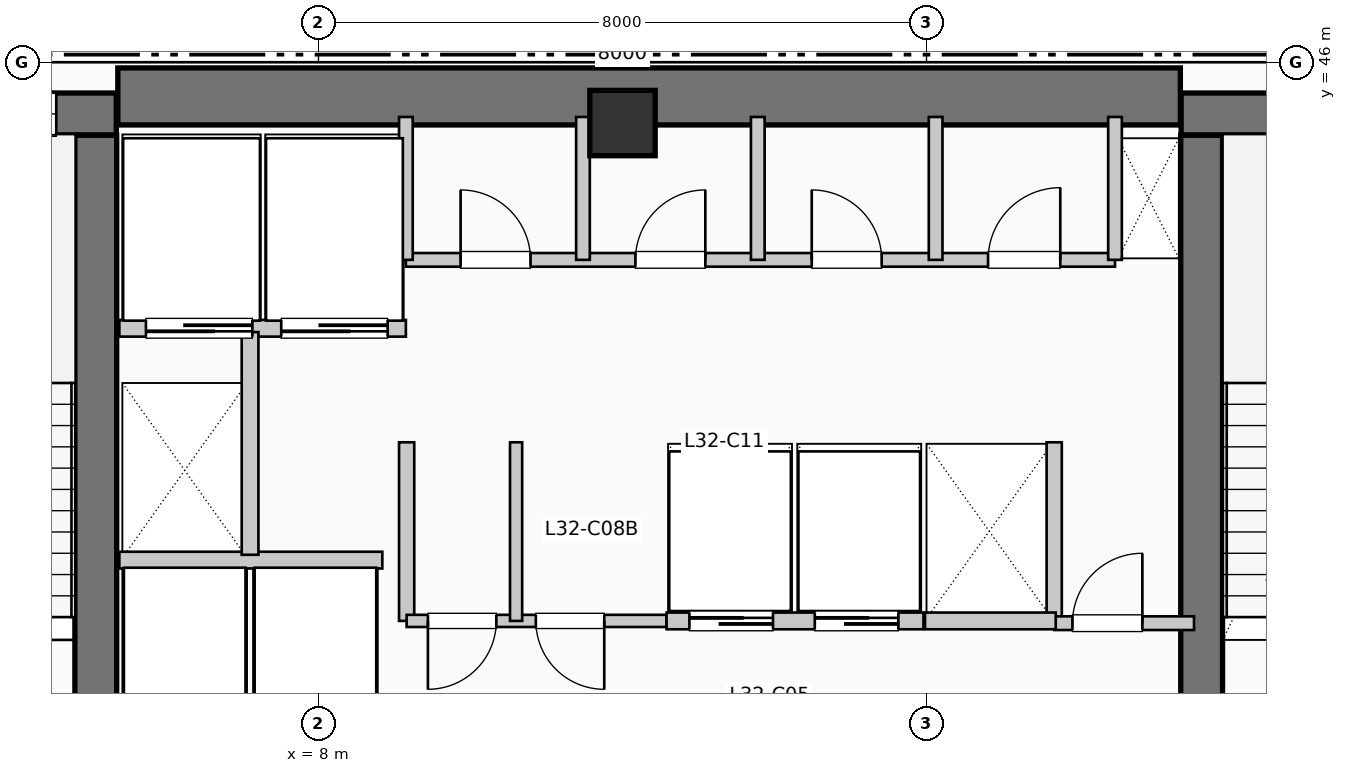
"""IFC4 building model, lengths in metres.
Left out: names, types, materials, properties, quantities, classifications, styles, units other than length and angle.
Written with IfcOpenShell. Run it as: python <this file> out.ifc"""

import sys

from ifc_helpers import new_model, si_unit, direction, frame, frame_2d, origin, origin_2d, place, context, subcontext, project, spatial, rectangle, extrude, element, fill, save


model = new_model("IFC4")
c1 = context("Model", 3, precision=1e-05, world=origin(), true_north=direction((0.0, 1.0)))
c2 = subcontext(c1, "Body", "Model", "MODEL_VIEW")
j1 = project(units=[si_unit("LENGTHUNIT", "METRE"), si_unit("PLANEANGLEUNIT", "RADIAN")], contexts=[c1])
p1 = place(None, origin())
s1 = spatial("IfcSite", under=j1, at=p1, CompositionType="ELEMENT")
p2 = place(p1, origin())
s2 = spatial("IfcBuilding", under=s1, at=p2, CompositionType="ELEMENT")
p3 = place(p2, frame((0.0, 0.0, 134.97)))
s3 = spatial("IfcBuildingStorey", under=s2, at=p3, CompositionType="ELEMENT", Elevation=134.97)
p4 = place(p3, frame((5.36, 45.55, 0.0), z_axis=(0.0, 0.0, 1.0), x_axis=(1.0, 0.0, 0.0)))
e1 = element("IfcWall", 1, at=p4, inside=s3, PredefinedType="SHEAR", context=c2, shape_type="SweptSolid", body=[
    extrude(rectangle(XDim=13.98, YDim=0.75, at=frame_2d((6.99, 0.0))), origin(), (0.0, 0.0, 1.0), 3.96),
])
p5 = place(p3, frame((5.07, 37.15, 0.0), z_axis=(0.0, 0.0, 1.0), x_axis=(0.0, 1.0, 0.0)))
e2 = element("IfcWall", 2, at=p5, inside=s3, PredefinedType="SHEAR", context=c2, shape_type="SweptSolid", body=[
    extrude(rectangle(XDim=7.89, YDim=0.55, at=frame_2d((3.945, 0.0))), origin(), (0.0, 0.0, 1.0), 3.96),
])
p6 = place(p3, frame((1.1, 45.32, 0.0), z_axis=(0.0, 0.0, 1.0), x_axis=(1.0, 0.0, 0.0)))
e3 = element("IfcWall", 3, at=p6, inside=s3, PredefinedType="SHEAR", context=c2, shape_type="SweptSolid", body=[
    extrude(rectangle(XDim=4.24, YDim=0.55, at=frame_2d((2.12, 0.0))), origin(), (0.0, 0.0, 1.0), 3.96),
])
p7 = place(p6, frame((2.05, 0.0, 1.05)))
e4 = element("IfcOpeningElement", 4, at=p7, cuts=e3, PredefinedType="OPENING", context=c2, shape_type="SweptSolid", body=[
    extrude(rectangle(XDim=1.4, YDim=1.8, at=frame_2d((0.7, 0.9))), frame((0.0, 0.285, 0.0), z_axis=(0.0, -1.0, 0.0), x_axis=(1.0, 0.0, 0.0)), (0.0, 0.0, 1.0), 0.57),
])
p8 = place(p3, frame((19.62, 37.15, 0.0), z_axis=(0.0, 0.0, 1.0), x_axis=(0.0, 1.0, 0.0)))
e5 = element("IfcWall", 5, at=p8, inside=s3, PredefinedType="SHEAR", context=c2, shape_type="SweptSolid", body=[
    extrude(rectangle(XDim=7.89, YDim=0.55, at=frame_2d((3.945, 0.0))), origin(), (0.0, 0.0, 1.0), 3.96),
])
p9 = place(p3, frame((19.35, 45.32, 0.0), z_axis=(0.0, 0.0, 1.0), x_axis=(1.0, 0.0, 0.0)))
e6 = element("IfcWall", 6, at=p9, inside=s3, PredefinedType="SHEAR", context=c2, shape_type="SweptSolid", body=[
    extrude(rectangle(XDim=3.69, YDim=0.55, at=frame_2d((1.845, 0.0))), origin(), (0.0, 0.0, 1.0), 3.96),
])
p10 = place(p9, frame((1.15, 0.0, 1.05)))
e7 = element("IfcOpeningElement", 7, at=p10, cuts=e6, PredefinedType="OPENING", context=c2, shape_type="SweptSolid", body=[
    extrude(rectangle(XDim=1.4, YDim=1.8, at=frame_2d((0.7, 0.9))), frame((0.0, 0.285, 0.0), z_axis=(0.0, -1.0, 0.0), x_axis=(1.0, 0.0, 0.0)), (0.0, 0.0, 1.0), 0.57),
])
p11 = place(p3, frame((12.0, 45.2, 0.0), z_axis=(0.0, 0.0, 1.0), x_axis=(1.0, 0.0, 0.0)))
e8 = element("IfcColumn", 8, at=p11, inside=s3, PredefinedType="COLUMN", context=c2, shape_type="SweptSolid", body=[
    extrude(rectangle(XDim=0.86, YDim=0.86, at=origin_2d()), origin(), (0.0, 0.0, 1.0), 3.96),
])
p12 = place(p3, frame((5.38, 39.45, 0.0), z_axis=(0.0, 0.0, 1.0), x_axis=(1.0, 0.0, 0.0)))
e9 = element("IfcWall", 9, at=p12, inside=s3, PredefinedType="PARTITIONING", context=c2, shape_type="SweptSolid", body=[
    extrude(rectangle(XDim=3.46, YDim=0.22, at=frame_2d((1.73, 0.0))), origin(), (0.0, 0.0, 1.0), 3.71),
])
p13 = place(p3, frame((5.38, 42.5, 0.0), z_axis=(0.0, 0.0, 1.0), x_axis=(1.0, 0.0, 0.0)))
e10 = element("IfcWall", 10, at=p13, inside=s3, PredefinedType="PARTITIONING", context=c2, shape_type="SweptSolid", body=[
    extrude(rectangle(XDim=3.77, YDim=0.22, at=frame_2d((1.885, 0.0))), origin(), (0.0, 0.0, 1.0), 3.71),
])
p14 = place(p13, frame((1.75, 0.0, 0.0), z_axis=(0.0, 0.0, 1.0), x_axis=(-1.0, 0.0, 0.0)))
e11 = element("IfcOpeningElement", 11, at=p14, cuts=e10, PredefinedType="OPENING", context=c2, shape_type="SweptSolid", body=[
    extrude(rectangle(XDim=1.4, YDim=2.2, at=frame_2d((0.7, 1.1))), frame((0.0, 0.12, 0.0), z_axis=(0.0, -1.0, 0.0), x_axis=(1.0, 0.0, 0.0)), (0.0, 0.0, 1.0), 0.24),
])
p15 = place(p13, frame((3.53, 0.0, 0.0), z_axis=(0.0, 0.0, 1.0), x_axis=(-1.0, 0.0, 0.0)))
e12 = element("IfcOpeningElement", 12, at=p15, cuts=e10, PredefinedType="OPENING", context=c2, shape_type="SweptSolid", body=[
    extrude(rectangle(XDim=1.4, YDim=2.2, at=frame_2d((0.7, 1.1))), frame((0.0, 0.12, 0.0), z_axis=(0.0, -1.0, 0.0), x_axis=(1.0, 0.0, 0.0)), (0.0, 0.0, 1.0), 0.24),
])
p16 = place(p3, frame((7.1, 39.52, 0.0), z_axis=(0.0, 0.0, 1.0), x_axis=(0.0, 1.0, 0.0)))
e13 = element("IfcWall", 13, at=p16, inside=s3, PredefinedType="PARTITIONING", context=c2, shape_type="SweptSolid", body=[
    extrude(rectangle(XDim=2.93, YDim=0.22, at=frame_2d((1.465, 0.0))), origin(), (0.0, 0.0, 1.0), 3.71),
])
for number, where, z_axis, x_axis in (
    (14, (9.16, 38.65, 0.0), (0.0, 0.0, 1.0), (0.0, 1.0, 0.0)),
    (15, (17.68, 38.65, 0.0), (0.0, 0.0, 1.0), (0.0, 1.0, 0.0)),
):
    element("IfcWall", number, at=place(p3, frame(where, z_axis=z_axis, x_axis=x_axis)), inside=s3, PredefinedType="PARTITIONING", context=c2, shape_type="SweptSolid", body=[
        extrude(rectangle(XDim=2.35, YDim=0.2, at=frame_2d((1.175, 0.0))), origin(), (0.0, 0.0, 1.0), 3.71),
    ])
p17 = place(p3, frame((17.68, 38.62, 0.0), z_axis=(0.0, 0.0, 1.0), x_axis=(1.0, 0.0, 0.0)))
e16 = element("IfcWall", 16, at=p17, inside=s3, PredefinedType="PARTITIONING", context=c2, shape_type="SweptSolid", body=[
    extrude(rectangle(XDim=1.84, YDim=0.18, at=frame_2d((0.92, 0.0))), origin(), (0.0, 0.0, 1.0), 3.71),
])
p18 = place(p17, frame((0.24, 0.0, 0.0)))
e17 = element("IfcOpeningElement", 17, at=p18, cuts=e16, PredefinedType="OPENING", context=c2, shape_type="SweptSolid", body=[
    extrude(rectangle(XDim=0.92, YDim=2.1, at=frame_2d((0.46, 1.05))), frame((0.0, 0.1, 0.0), z_axis=(0.0, -1.0, 0.0), x_axis=(1.0, 0.0, 0.0)), (0.0, 0.0, 1.0), 0.2),
])
p19 = place(p3, frame((9.16, 38.65, 0.0), z_axis=(0.0, 0.0, 1.0), x_axis=(1.0, 0.0, 0.0)))
e18 = element("IfcWall", 18, at=p19, inside=s3, PredefinedType="PARTITIONING", context=c2, shape_type="SweptSolid", body=[
    extrude(rectangle(XDim=3.42, YDim=0.16, at=frame_2d((1.71, 0.0))), origin(), (0.0, 0.0, 1.0), 3.71),
])
p20 = place(p19, frame((1.18, 0.0, 0.0), z_axis=(0.0, 0.0, 1.0), x_axis=(-1.0, 0.0, 0.0)))
e19 = element("IfcOpeningElement", 19, at=p20, cuts=e18, PredefinedType="OPENING", context=c2, shape_type="SweptSolid", body=[
    extrude(rectangle(XDim=0.9, YDim=2.15, at=frame_2d((0.45, 1.075))), frame((0.0, 0.09, 0.0), z_axis=(0.0, -1.0, 0.0), x_axis=(1.0, 0.0, 0.0)), (0.0, 0.0, 1.0), 0.18),
])
p21 = place(p19, frame((2.6, 0.0, 0.0), z_axis=(0.0, 0.0, 1.0), x_axis=(-1.0, 0.0, 0.0)))
e20 = element("IfcOpeningElement", 20, at=p21, cuts=e18, PredefinedType="OPENING", context=c2, shape_type="SweptSolid", body=[
    extrude(rectangle(XDim=0.9, YDim=2.15, at=frame_2d((0.45, 1.075))), frame((0.0, 0.09, 0.0), z_axis=(0.0, -1.0, 0.0), x_axis=(1.0, 0.0, 0.0)), (0.0, 0.0, 1.0), 0.18),
])
p22 = place(p3, frame((10.6, 38.65, 0.0), z_axis=(0.0, 0.0, 1.0), x_axis=(0.0, 1.0, 0.0)))
e21 = element("IfcWall", 21, at=p22, inside=s3, PredefinedType="PARTITIONING", context=c2, shape_type="SweptSolid", body=[
    extrude(rectangle(XDim=2.35, YDim=0.16, at=frame_2d((1.175, 0.0))), origin(), (0.0, 0.0, 1.0), 3.71),
])
p23 = place(p3, frame((12.58, 38.65, 0.0), z_axis=(0.0, 0.0, 1.0), x_axis=(1.0, 0.0, 0.0)))
e22 = element("IfcWall", 22, at=p23, inside=s3, PredefinedType="PARTITIONING", context=c2, shape_type="SweptSolid", body=[
    extrude(rectangle(XDim=3.38, YDim=0.22, at=frame_2d((1.69, 0.0))), origin(), (0.0, 0.0, 1.0), 3.71),
])
p24 = place(p23, frame((0.3, 0.0, 0.0)))
e23 = element("IfcOpeningElement", 23, at=p24, cuts=e22, PredefinedType="OPENING", context=c2, shape_type="SweptSolid", body=[
    extrude(rectangle(XDim=1.1, YDim=2.2, at=frame_2d((0.55, 1.1))), frame((0.0, 0.12, 0.0), z_axis=(0.0, -1.0, 0.0), x_axis=(1.0, 0.0, 0.0)), (0.0, 0.0, 1.0), 0.24),
])
p25 = place(p23, frame((1.95, 0.0, 0.0)))
e24 = element("IfcOpeningElement", 24, at=p25, cuts=e22, PredefinedType="OPENING", context=c2, shape_type="SweptSolid", body=[
    extrude(rectangle(XDim=1.1, YDim=2.2, at=frame_2d((0.55, 1.1))), frame((0.0, 0.12, 0.0), z_axis=(0.0, -1.0, 0.0), x_axis=(1.0, 0.0, 0.0)), (0.0, 0.0, 1.0), 0.24),
])
p26 = place(p3, frame((15.98, 38.65, 0.0), z_axis=(0.0, 0.0, 1.0), x_axis=(1.0, 0.0, 0.0)))
e25 = element("IfcWall", 25, at=p26, inside=s3, PredefinedType="PARTITIONING", context=c2, shape_type="SweptSolid", body=[
    extrude(rectangle(XDim=1.72, YDim=0.22, at=frame_2d((0.86, 0.0))), origin(), (0.0, 0.0, 1.0), 3.71),
])
p27 = place(p3, frame((9.15, 43.4, 0.0), z_axis=(0.0, 0.0, 1.0), x_axis=(1.0, 0.0, 0.0)))
e26 = element("IfcWall", 26, at=p27, inside=s3, PredefinedType="PLUMBINGWALL", context=c2, shape_type="SweptSolid", body=[
    extrude(rectangle(XDim=9.33, YDim=0.18, at=frame_2d((4.665, 0.0))), origin(), (0.0, 0.0, 1.0), 3.71),
])
p28 = place(p27, frame((0.72, 0.0, 0.0)))
e27 = element("IfcOpeningElement", 27, at=p28, cuts=e26, PredefinedType="OPENING", context=c2, shape_type="SweptSolid", body=[
    extrude(rectangle(XDim=0.92, YDim=2.1, at=frame_2d((0.46, 1.05))), frame((0.0, 0.1, 0.0), z_axis=(0.0, -1.0, 0.0), x_axis=(1.0, 0.0, 0.0)), (0.0, 0.0, 1.0), 0.2),
])
p29 = place(p27, frame((3.02, 0.0, 0.0)))
e28 = element("IfcOpeningElement", 28, at=p29, cuts=e26, PredefinedType="OPENING", context=c2, shape_type="SweptSolid", body=[
    extrude(rectangle(XDim=0.92, YDim=2.1, at=frame_2d((0.46, 1.05))), frame((0.0, 0.1, 0.0), z_axis=(0.0, -1.0, 0.0), x_axis=(1.0, 0.0, 0.0)), (0.0, 0.0, 1.0), 0.2),
])
p30 = place(p27, frame((5.34, 0.0, 0.0)))
e29 = element("IfcOpeningElement", 29, at=p30, cuts=e26, PredefinedType="OPENING", context=c2, shape_type="SweptSolid", body=[
    extrude(rectangle(XDim=0.92, YDim=2.1, at=frame_2d((0.46, 1.05))), frame((0.0, 0.1, 0.0), z_axis=(0.0, -1.0, 0.0), x_axis=(1.0, 0.0, 0.0)), (0.0, 0.0, 1.0), 0.2),
])
p31 = place(p27, frame((7.66, 0.0, 0.0)))
e30 = element("IfcOpeningElement", 30, at=p31, cuts=e26, PredefinedType="OPENING", context=c2, shape_type="SweptSolid", body=[
    extrude(rectangle(XDim=0.95, YDim=2.1, at=frame_2d((0.475, 1.05))), frame((0.0, 0.1, 0.0), z_axis=(0.0, -1.0, 0.0), x_axis=(1.0, 0.0, 0.0)), (0.0, 0.0, 1.0), 0.2),
])
for number, where, z_axis, x_axis in (
    (31, (9.15, 43.4, 0.0), (0.0, 0.0, 1.0), (0.0, 1.0, 0.0)),
    (32, (18.48, 43.4, 0.0), (0.0, 0.0, 1.0), (0.0, 1.0, 0.0)),
    (33, (11.48, 43.4, 0.0), (0.0, 0.0, 1.0), (0.0, 1.0, 0.0)),
    (34, (13.78, 43.4, 0.0), (0.0, 0.0, 1.0), (0.0, 1.0, 0.0)),
    (35, (16.12, 43.4, 0.0), (0.0, 0.0, 1.0), (0.0, 1.0, 0.0)),
):
    element("IfcWall", number, at=place(p3, frame(where, z_axis=z_axis, x_axis=x_axis)), inside=s3, PredefinedType="PLUMBINGWALL", context=c2, shape_type="SweptSolid", body=[
        extrude(rectangle(XDim=1.88, YDim=0.18, at=frame_2d((0.94, 0.0))), origin(), (0.0, 0.0, 1.0), 3.71),
    ])
p32 = place(p7, origin())
e36 = element("IfcWindow", 36, at=p32, inside=s3, PartitioningType="SINGLE_PANEL", PredefinedType="WINDOW", context=c2, shape_type="SweptSolid", body=[
    extrude(rectangle(XDim=1.4, YDim=1.8, at=frame_2d((0.7, 0.9))), frame((0.0, 0.03, 0.0), z_axis=(0.0, -1.0, 0.0), x_axis=(1.0, 0.0, 0.0)), (0.0, 0.0, 1.0), 0.06),
])
fill(e4, e36)
p33 = place(p14, origin())
e37 = element("IfcDoor", 37, at=p33, inside=s3, OperationType="SLIDING_TO_LEFT", PredefinedType="DOOR", context=c2, shape_type="SweptSolid", body=[
    extrude(rectangle(XDim=1.4, YDim=2.2, at=frame_2d((0.7, 1.1))), frame((0.0, 0.025, 0.0), z_axis=(0.0, -1.0, 0.0), x_axis=(1.0, 0.0, 0.0)), (0.0, 0.0, 1.0), 0.05),
])
fill(e11, e37)
p34 = place(p15, origin())
e38 = element("IfcDoor", 38, at=p34, inside=s3, OperationType="SLIDING_TO_LEFT", PredefinedType="DOOR", context=c2, shape_type="SweptSolid", body=[
    extrude(rectangle(XDim=1.4, YDim=2.2, at=frame_2d((0.7, 1.1))), frame((0.0, 0.025, 0.0), z_axis=(0.0, -1.0, 0.0), x_axis=(1.0, 0.0, 0.0)), (0.0, 0.0, 1.0), 0.05),
])
fill(e12, e38)
p35 = place(p18, origin())
e39 = element("IfcDoor", 39, at=p35, inside=s3, OperationType="SINGLE_SWING_RIGHT", PredefinedType="DOOR", context=c2, shape_type="SweptSolid", body=[
    extrude(rectangle(XDim=0.92, YDim=2.1, at=frame_2d((0.46, 1.05))), frame((0.0, 0.025, 0.0), z_axis=(0.0, -1.0, 0.0), x_axis=(1.0, 0.0, 0.0)), (0.0, 0.0, 1.0), 0.05),
])
fill(e17, e39)
p36 = place(p20, origin())
e40 = element("IfcDoor", 40, at=p36, inside=s3, OperationType="SINGLE_SWING_LEFT", PredefinedType="DOOR", context=c2, shape_type="SweptSolid", body=[
    extrude(rectangle(XDim=0.9, YDim=2.15, at=frame_2d((0.45, 1.075))), frame((0.0, 0.025, 0.0), z_axis=(0.0, -1.0, 0.0), x_axis=(1.0, 0.0, 0.0)), (0.0, 0.0, 1.0), 0.05),
])
fill(e19, e40)
p37 = place(p21, origin())
e41 = element("IfcDoor", 41, at=p37, inside=s3, OperationType="SINGLE_SWING_RIGHT", PredefinedType="DOOR", context=c2, shape_type="SweptSolid", body=[
    extrude(rectangle(XDim=0.9, YDim=2.15, at=frame_2d((0.45, 1.075))), frame((0.0, 0.025, 0.0), z_axis=(0.0, -1.0, 0.0), x_axis=(1.0, 0.0, 0.0)), (0.0, 0.0, 1.0), 0.05),
])
fill(e20, e41)
p38 = place(p24, origin())
e42 = element("IfcDoor", 42, at=p38, inside=s3, OperationType="SLIDING_TO_RIGHT", PredefinedType="DOOR", context=c2, shape_type="SweptSolid", body=[
    extrude(rectangle(XDim=1.1, YDim=2.2, at=frame_2d((0.55, 1.1))), frame((0.0, 0.025, 0.0), z_axis=(0.0, -1.0, 0.0), x_axis=(1.0, 0.0, 0.0)), (0.0, 0.0, 1.0), 0.05),
])
fill(e23, e42)
p39 = place(p25, origin())
e43 = element("IfcDoor", 43, at=p39, inside=s3, OperationType="SLIDING_TO_RIGHT", PredefinedType="DOOR", context=c2, shape_type="SweptSolid", body=[
    extrude(rectangle(XDim=1.1, YDim=2.2, at=frame_2d((0.55, 1.1))), frame((0.0, 0.025, 0.0), z_axis=(0.0, -1.0, 0.0), x_axis=(1.0, 0.0, 0.0)), (0.0, 0.0, 1.0), 0.05),
])
fill(e24, e43)
p40 = place(p28, origin())
e44 = element("IfcDoor", 44, at=p40, inside=s3, OperationType="SINGLE_SWING_LEFT", PredefinedType="DOOR", context=c2, shape_type="SweptSolid", body=[
    extrude(rectangle(XDim=0.92, YDim=2.1, at=frame_2d((0.46, 1.05))), frame((0.0, 0.025, 0.0), z_axis=(0.0, -1.0, 0.0), x_axis=(1.0, 0.0, 0.0)), (0.0, 0.0, 1.0), 0.05),
])
fill(e27, e44)
p41 = place(p29, origin())
e45 = element("IfcDoor", 45, at=p41, inside=s3, OperationType="SINGLE_SWING_RIGHT", PredefinedType="DOOR", context=c2, shape_type="SweptSolid", body=[
    extrude(rectangle(XDim=0.92, YDim=2.1, at=frame_2d((0.46, 1.05))), frame((0.0, 0.025, 0.0), z_axis=(0.0, -1.0, 0.0), x_axis=(1.0, 0.0, 0.0)), (0.0, 0.0, 1.0), 0.05),
])
fill(e28, e45)
p42 = place(p30, origin())
e46 = element("IfcDoor", 46, at=p42, inside=s3, OperationType="SINGLE_SWING_LEFT", PredefinedType="DOOR", context=c2, shape_type="SweptSolid", body=[
    extrude(rectangle(XDim=0.92, YDim=2.1, at=frame_2d((0.46, 1.05))), frame((0.0, 0.025, 0.0), z_axis=(0.0, -1.0, 0.0), x_axis=(1.0, 0.0, 0.0)), (0.0, 0.0, 1.0), 0.05),
])
fill(e29, e46)
p43 = place(p31, origin())
e47 = element("IfcDoor", 47, at=p43, inside=s3, OperationType="SINGLE_SWING_RIGHT", PredefinedType="DOOR", context=c2, shape_type="SweptSolid", body=[
    extrude(rectangle(XDim=0.95, YDim=2.1, at=frame_2d((0.475, 1.05))), frame((0.0, 0.025, 0.0), z_axis=(0.0, -1.0, 0.0), x_axis=(1.0, 0.0, 0.0)), (0.0, 0.0, 1.0), 0.05),
])
fill(e30, e47)
save(model, sys.argv[1])
